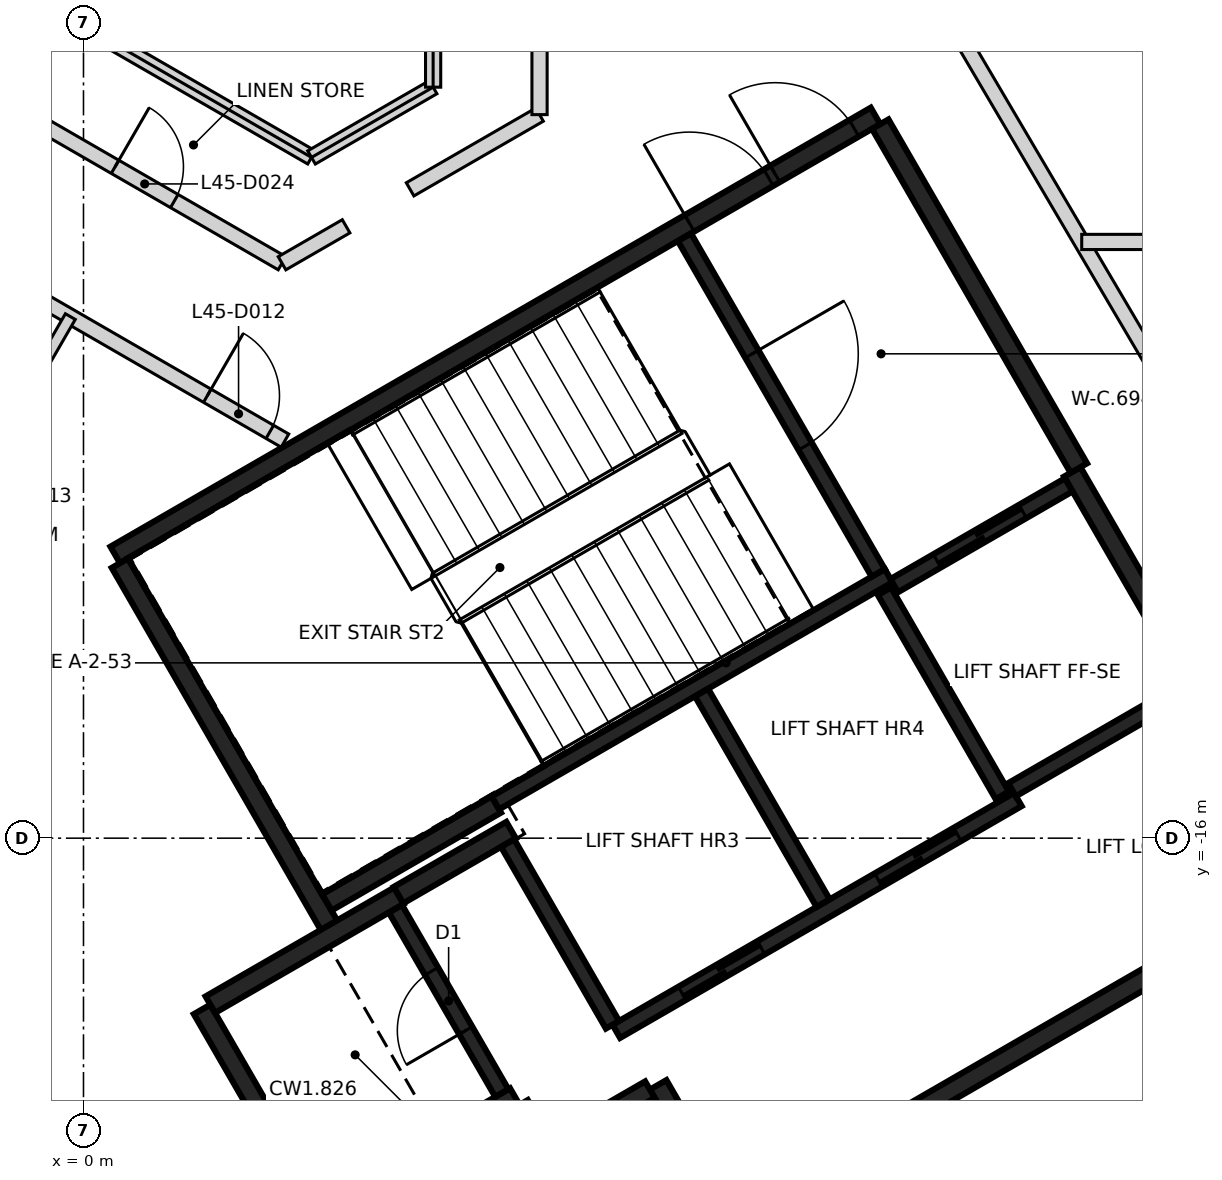
"""IFC4 building model, lengths in metres.
Left out: names, types, materials, properties, quantities, classifications, styles, units other than length and angle.
Written with IfcOpenShell. Run it as: python <this file> out.ifc"""

import sys

from ifc_helpers import new_model, si_unit, direction, frame, frame_2d, origin, place, context, subcontext, project, spatial, rectangle, extrude, element, fill, save


model = new_model("IFC4")
c1 = context("Model", 3, precision=1e-05, world=origin(), true_north=direction((0.0, 1.0)))
c2 = subcontext(c1, "Body", "Model", "MODEL_VIEW")
j1 = project(units=[si_unit("LENGTHUNIT", "METRE"), si_unit("PLANEANGLEUNIT", "RADIAN")], contexts=[c1])
p1 = place(None, origin())
s1 = spatial("IfcSite", under=j1, at=p1, CompositionType="ELEMENT")
p2 = place(p1, origin())
s2 = spatial("IfcBuilding", under=s1, at=p2, CompositionType="ELEMENT")
p3 = place(p2, frame((0.0, 0.0, 182.8)))
s3 = spatial("IfcBuildingStorey", under=s2, at=p3, CompositionType="ELEMENT", Elevation=182.8)
p4 = place(p3, frame((0.417, -12.273, 0.0), z_axis=(0.0, 0.0, 1.0), x_axis=(0.866021906294, 0.500006057782, 0.0)))
e1 = element("IfcWall", 1, at=p4, inside=s3, PredefinedType="SHEAR", context=c2, shape_type="SweptSolid", body=[
    extrude(rectangle(XDim=11.55, YDim=0.25, at=frame_2d((5.775, 0.0))), origin(), (0.0, 0.0, 1.0), 3.25),
])
p5 = place(p4, frame((10.025, 0.0, 0.0)))
e2 = element("IfcOpeningElement", 2, at=p5, cuts=e1, PredefinedType="OPENING", context=c2, shape_type="SweptSolid", body=[
    extrude(rectangle(XDim=1.2, YDim=2.1, at=frame_2d((0.6, 1.05))), frame((0.0, 0.135, 0.0), z_axis=(0.0, -1.0, 0.0), x_axis=(1.0, 0.0, 0.0)), (0.0, 0.0, 1.0), 0.27),
])
p6 = place(p4, frame((8.725, 0.0, 0.0)))
e3 = element("IfcOpeningElement", 3, at=p6, cuts=e1, PredefinedType="OPENING", context=c2, shape_type="SweptSolid", body=[
    extrude(rectangle(XDim=1.2, YDim=2.1, at=frame_2d((0.6, 1.05))), frame((0.0, 0.135, 0.0), z_axis=(0.0, -1.0, 0.0), x_axis=(1.0, 0.0, 0.0)), (0.0, 0.0, 1.0), 0.27),
])
p7 = place(p3, frame((16.133, -16.594, 0.0), z_axis=(0.0, 0.0, 1.0), x_axis=(-0.866022959057, -0.500004234368, 0.0)))
e4 = element("IfcWall", 4, at=p7, inside=s3, PredefinedType="SHEAR", context=c2, shape_type="SweptSolid", body=[
    extrude(rectangle(XDim=8.75, YDim=0.25, at=frame_2d((4.375, 0.0))), origin(), (0.0, 0.0, 1.0), 3.25),
])
p8 = place(p3, frame((13.008, -11.181, 0.0), z_axis=(0.0, 0.0, 1.0), x_axis=(0.500001955336, -0.866024274868, 0.0)))
e5 = element("IfcWall", 5, at=p8, inside=s3, PredefinedType="SHEAR", context=c2, shape_type="SweptSolid", body=[
    extrude(rectangle(XDim=6.125, YDim=0.25, at=frame_2d((3.062, 0.0))), origin(), (0.0, 0.0, 1.0), 3.25),
])
p9 = place(p8, frame((3.563, 0.0, 0.0)))
e6 = element("IfcOpeningElement", 6, at=p9, cuts=e5, PredefinedType="OPENING", context=c2, shape_type="SweptSolid", body=[
    extrude(rectangle(XDim=1.0, YDim=2.1, at=frame_2d((0.5, 1.05))), frame((0.0, 0.135, 0.0), z_axis=(0.0, -1.0, 0.0), x_axis=(1.0, 0.0, 0.0)), (0.0, 0.0, 1.0), 0.27),
])
p10 = place(p3, frame((3.235, -17.153, 0.0), z_axis=(0.0, 0.0, 1.0), x_axis=(-0.500008851346, 0.866020293397, 0.0)))
e7 = element("IfcWall", 7, at=p10, inside=s3, PredefinedType="SHEAR", context=c2, shape_type="SweptSolid", body=[
    extrude(rectangle(XDim=5.51, YDim=0.25, at=frame_2d((2.755, 0.0))), origin(), (0.0, 0.0, 1.0), 3.25),
])
p11 = place(p3, frame((10.483, -6.606, 0.0), z_axis=(0.0, 0.0, 1.0), x_axis=(0.49999885962, -0.866026062182, 0.0)))
e8 = element("IfcWall", 8, at=p11, inside=s3, PredefinedType="SHEAR", context=c2, shape_type="SweptSolid", body=[
    extrude(rectangle(XDim=5.225, YDim=0.25, at=frame_2d((2.612, 0.0))), origin(), (0.0, 0.0, 1.0), 3.25),
])
p12 = place(p3, frame((3.085, -20.894, 0.0), z_axis=(0.0, 0.0, 1.0), x_axis=(-0.499978833458, 0.866037623948, 0.0)))
e9 = element("IfcWall", 9, at=p12, inside=s3, PredefinedType="SHEAR", context=c2, shape_type="SweptSolid", body=[
    extrude(rectangle(XDim=3.05, YDim=0.25, at=frame_2d((1.525, 0.0))), origin(), (0.0, 0.0, 1.0), 3.25),
])
p13 = place(p3, frame((1.669, -18.19, 0.0), z_axis=(0.0, 0.0, 1.0), x_axis=(0.866042235819, 0.499970844928, 0.0)))
e10 = element("IfcWall", 10, at=p13, inside=s3, PredefinedType="SHEAR", context=c2, shape_type="SweptSolid", body=[
    extrude(rectangle(XDim=2.865, YDim=0.25, at=frame_2d((1.432, 0.0))), origin(), (0.0, 0.0, 1.0), 3.25),
])
p14 = place(p3, frame((5.675, -19.399, 0.0), z_axis=(0.0, 0.0, 1.0), x_axis=(-0.866026637627, -0.499997862916, 0.0)))
e11 = element("IfcWall", 11, at=p14, inside=s3, PredefinedType="SHEAR", context=c2, shape_type="SweptSolid", body=[
    extrude(rectangle(XDim=2.865, YDim=0.25, at=frame_2d((1.432, 0.0))), origin(), (0.0, 0.0, 1.0), 3.25),
])
p15 = place(p3, frame((5.431, -15.556, 0.0), z_axis=(0.0, 0.0, 1.0), x_axis=(-0.866022940537, -0.500004266446, 0.0)))
e12 = element("IfcWall", 12, at=p15, inside=s3, PredefinedType="SHEAR", context=c2, shape_type="SweptSolid", body=[
    extrude(rectangle(XDim=2.575, YDim=0.25, at=frame_2d((1.287, 0.0))), origin(), (0.0, 0.0, 1.0), 3.25),
])
p16 = place(p3, frame((8.493, -20.86, 0.0), z_axis=(0.0, 0.0, 1.0), x_axis=(-0.500039802285, 0.866002422705, 0.0)))
e13 = element("IfcWall", 13, at=p16, inside=s3, PredefinedType="SHEAR", context=c2, shape_type="SweptSolid", body=[
    extrude(rectangle(XDim=1.865, YDim=0.25, at=frame_2d((0.932, 0.0))), origin(), (0.0, 0.0, 1.0), 3.25),
])
p17 = place(p3, frame((4.145, -16.749, 0.0), z_axis=(0.0, 0.0, 1.0), x_axis=(0.866038183914, 0.499977863513, 0.0)))
e14 = element("IfcWall", 14, at=p17, inside=s3, PredefinedType="SHEAR", context=c2, shape_type="SweptSolid", body=[
    extrude(rectangle(XDim=1.71, YDim=0.25, at=frame_2d((0.855, 0.0))), origin(), (0.0, 0.0, 1.0), 3.25),
])
p18 = place(p3, frame((7.452, -19.308, 0.0), z_axis=(0.0, 0.0, 1.0), x_axis=(-0.866044474677, -0.49996696679, 0.0)))
e15 = element("IfcWall", 15, at=p18, inside=s3, PredefinedType="SHEAR", context=c2, shape_type="SweptSolid", body=[
    extrude(rectangle(XDim=1.584, YDim=0.25, at=frame_2d((0.792, 0.0))), origin(), (0.0, 0.0, 1.0), 3.25),
])
p19 = place(p3, frame((6.017, -19.992, 0.0), z_axis=(0.0, 0.0, 1.0), x_axis=(-0.500364886717, 0.865814633822, 0.0)))
e16 = element("IfcWall", 16, at=p19, inside=s3, PredefinedType="SHEAR", context=c2, shape_type="SweptSolid", body=[
    extrude(rectangle(XDim=0.559, YDim=0.25, at=frame_2d((0.28, 0.0))), origin(), (0.0, 0.0, 1.0), 3.25),
])
p20 = place(p3, frame((5.419, -15.534, 0.0), z_axis=(0.0, 0.0, 1.0), x_axis=(0.866029065029, 0.499993658486, 0.0)))
e17 = element("IfcWall", 17, at=p20, inside=s3, PredefinedType="SHEAR", context=c2, shape_type="SweptSolid", body=[
    extrude(rectangle(XDim=5.974, YDim=0.2, at=frame_2d((2.987, 0.0))), origin(), (0.0, 0.0, 1.0), 3.25),
])
p21 = place(p3, frame((7.01, -18.542, 0.0), z_axis=(0.0, 0.0, 1.0), x_axis=(0.866030299012, 0.499991521122, 0.0)))
e18 = element("IfcWall", 18, at=p21, inside=s3, PredefinedType="SHEAR", context=c2, shape_type="SweptSolid", body=[
    extrude(rectangle(XDim=6.1, YDim=0.2, at=frame_2d((3.05, 0.0))), origin(), (0.0, 0.0, 1.0), 3.25),
])
p22 = place(p21, frame((1.0, 0.0, 0.0)))
e19 = element("IfcOpeningElement", 19, at=p22, cuts=e18, PredefinedType="OPENING", context=c2, shape_type="SweptSolid", body=[
    extrude(rectangle(XDim=1.2, YDim=2.1, at=frame_2d((0.6, 1.05))), frame((0.0, 0.11, 0.0), z_axis=(0.0, -1.0, 0.0), x_axis=(1.0, 0.0, 0.0)), (0.0, 0.0, 1.0), 0.22),
])
p23 = place(p21, frame((3.982, 0.0, 0.0)))
e20 = element("IfcOpeningElement", 20, at=p23, cuts=e18, PredefinedType="OPENING", context=c2, shape_type="SweptSolid", body=[
    extrude(rectangle(XDim=1.2, YDim=2.1, at=frame_2d((0.6, 1.05))), frame((0.0, 0.11, 0.0), z_axis=(0.0, -1.0, 0.0), x_axis=(1.0, 0.0, 0.0)), (0.0, 0.0, 1.0), 0.22),
])
p24 = place(p3, frame((7.906, -8.094, 0.0), z_axis=(0.0, 0.0, 1.0), x_axis=(0.500027839223, -0.866009330205, 0.0)))
e21 = element("IfcWall", 21, at=p24, inside=s3, PredefinedType="SHEAR", context=c2, shape_type="SweptSolid", body=[
    extrude(rectangle(XDim=5.098, YDim=0.2, at=frame_2d((2.549, 0.0))), origin(), (0.0, 0.0, 1.0), 3.25),
])
p25 = place(p24, frame((1.774, 0.0, 0.0)))
e22 = element("IfcOpeningElement", 22, at=p25, cuts=e21, PredefinedType="OPENING", context=c2, shape_type="SweptSolid", body=[
    extrude(rectangle(XDim=1.4, YDim=2.1, at=frame_2d((0.7, 1.05))), frame((0.0, 0.11, 0.0), z_axis=(0.0, -1.0, 0.0), x_axis=(1.0, 0.0, 0.0)), (0.0, 0.0, 1.0), 0.22),
])
p26 = place(p3, frame((8.132, -14.084, 0.0), z_axis=(0.0, 0.0, 1.0), x_axis=(0.499997778408, -0.866026686418, 0.0)))
e23 = element("IfcWall", 23, at=p26, inside=s3, PredefinedType="SHEAR", context=c2, shape_type="SweptSolid", body=[
    extrude(rectangle(XDim=3.198, YDim=0.2, at=frame_2d((1.599, 0.0))), origin(), (0.0, 0.0, 1.0), 3.25),
])
p27 = place(p3, frame((5.503, -19.352, 0.0), z_axis=(0.0, 0.0, 1.0), x_axis=(-0.499986818241, 0.866033014143, 0.0)))
e24 = element("IfcWall", 24, at=p27, inside=s3, PredefinedType="SHEAR", context=c2, shape_type="SweptSolid", body=[
    extrude(rectangle(XDim=2.798, YDim=0.2, at=frame_2d((1.399, 0.0))), origin(), (0.0, 0.0, 1.0), 3.25),
])
p28 = place(p27, frame((0.949, 0.0, 0.0)))
e25 = element("IfcOpeningElement", 25, at=p28, cuts=e24, PredefinedType="OPENING", context=c2, shape_type="SweptSolid", body=[
    extrude(rectangle(XDim=0.9, YDim=2.1, at=frame_2d((0.45, 1.05))), frame((0.0, 0.11, 0.0), z_axis=(0.0, -1.0, 0.0), x_axis=(1.0, 0.0, 0.0)), (0.0, 0.0, 1.0), 0.22),
])
p29 = place(p3, frame((6.96, -18.455, 0.0), z_axis=(0.0, 0.0, 1.0), x_axis=(-0.499926705758, 0.866067716099, 0.0)))
e26 = element("IfcWall", 26, at=p29, inside=s3, PredefinedType="SHEAR", context=c2, shape_type="SweptSolid", body=[
    extrude(rectangle(XDim=2.759, YDim=0.2, at=frame_2d((1.38, 0.0))), origin(), (0.0, 0.0, 1.0), 3.25),
])
p30 = place(p3, frame((12.088, -15.437, 0.0), z_axis=(0.0, 0.0, 1.0), x_axis=(-0.500026960575, 0.86600983753, 0.0)))
e27 = element("IfcWall", 27, at=p30, inside=s3, PredefinedType="SHEAR", context=c2, shape_type="SweptSolid", body=[
    extrude(rectangle(XDim=3.1, YDim=0.2, at=frame_2d((1.55, 0.0))), origin(), (0.0, 0.0, 1.0), 3.25),
])
p31 = place(p3, frame((10.666, -12.678, 0.0), z_axis=(0.0, 0.0, 1.0), x_axis=(0.866018407898, 0.500012117035, 0.0)))
e28 = element("IfcWall", 28, at=p31, inside=s3, PredefinedType="SHEAR", context=c2, shape_type="SweptSolid", body=[
    extrude(rectangle(XDim=2.651, YDim=0.2, at=frame_2d((1.325, 0.0))), origin(), (0.0, 0.0, 1.0), 3.25),
])
p32 = place(p31, frame((0.652, 0.0, 0.0)))
e29 = element("IfcOpeningElement", 29, at=p32, cuts=e28, PredefinedType="OPENING", context=c2, shape_type="SweptSolid", body=[
    extrude(rectangle(XDim=1.3, YDim=2.1, at=frame_2d((0.65, 1.05))), frame((0.0, 0.11, 0.0), z_axis=(0.0, -1.0, 0.0), x_axis=(1.0, 0.0, 0.0)), (0.0, 0.0, 1.0), 0.22),
])
p33 = place(p3, frame((14.512, -14.037, 0.0), z_axis=(0.0, 0.0, 1.0), x_axis=(-0.866018407898, -0.500012117035, 0.0)))
e30 = element("IfcWall", 30, at=p33, inside=s3, PredefinedType="SHEAR", context=c2, shape_type="SweptSolid", body=[
    extrude(rectangle(XDim=2.651, YDim=0.2, at=frame_2d((1.325, 0.0))), origin(), (0.0, 0.0, 1.0), 3.25),
])
p34 = place(p3, frame((-8.612, -1.956, 0.0), z_axis=(0.0, 0.0, 1.0), x_axis=(0.866034386606, -0.499984440973, 0.0)))
e31 = element("IfcWall", 31, at=p34, inside=s3, PredefinedType="PARTITIONING", context=c2, shape_type="SweptSolid", body=[
    extrude(rectangle(XDim=12.96, YDim=0.2, at=frame_2d((6.48, 0.0))), origin(), (0.0, 0.0, 1.0), 3.25),
])
p35 = place(p34, frame((3.955, 0.0, 0.0)))
e32 = element("IfcOpeningElement", 32, at=p35, cuts=e31, PredefinedType="OPENING", context=c2, shape_type="SweptSolid", body=[
    extrude(rectangle(XDim=0.9, YDim=2.1, at=frame_2d((0.45, 1.05))), frame((0.0, 0.11, 0.0), z_axis=(0.0, -1.0, 0.0), x_axis=(1.0, 0.0, 0.0)), (0.0, 0.0, 1.0), 0.22),
])
p36 = place(p34, frame((10.424, 0.0, 0.0)))
e33 = element("IfcOpeningElement", 33, at=p36, cuts=e31, PredefinedType="OPENING", context=c2, shape_type="SweptSolid", body=[
    extrude(rectangle(XDim=0.9, YDim=2.1, at=frame_2d((0.45, 1.05))), frame((0.0, 0.11, 0.0), z_axis=(0.0, -1.0, 0.0), x_axis=(1.0, 0.0, 0.0)), (0.0, 0.0, 1.0), 0.22),
])
p37 = place(p3, frame((-8.301, -4.445, 0.0), z_axis=(0.0, 0.0, 1.0), x_axis=(0.865969859016, -0.500096194023, 0.0)))
e34 = element("IfcWall", 34, at=p37, inside=s3, PredefinedType="PARTITIONING", context=c2, shape_type="SweptSolid", body=[
    extrude(rectangle(XDim=12.647, YDim=0.2, at=frame_2d((6.323, 0.0))), origin(), (0.0, 0.0, 1.0), 3.25),
])
p38 = place(p37, frame((2.836, 0.0, 0.0)))
e35 = element("IfcOpeningElement", 35, at=p38, cuts=e34, PredefinedType="OPENING", context=c2, shape_type="SweptSolid", body=[
    extrude(rectangle(XDim=0.95, YDim=2.1, at=frame_2d((0.475, 1.05))), frame((0.0, 0.11, 0.0), z_axis=(0.0, -1.0, 0.0), x_axis=(1.0, 0.0, 0.0)), (0.0, 0.0, 1.0), 0.22),
])
p39 = place(p37, frame((11.467, 0.0, 0.0)))
e36 = element("IfcOpeningElement", 36, at=p39, cuts=e34, PredefinedType="OPENING", context=c2, shape_type="SweptSolid", body=[
    extrude(rectangle(XDim=0.95, YDim=2.1, at=frame_2d((0.475, 1.05))), frame((0.0, 0.11, 0.0), z_axis=(0.0, -1.0, 0.0), x_axis=(1.0, 0.0, 0.0)), (0.0, 0.0, 1.0), 0.22),
])
p40 = place(p3, frame((2.612, -8.437, 0.0), z_axis=(0.0, 0.0, 1.0), x_axis=(0.866026830048, 0.499997529631, 0.0)))
e37 = element("IfcWall", 37, at=p40, inside=s3, PredefinedType="PARTITIONING", context=c2, shape_type="SweptSolid", body=[
    extrude(rectangle(XDim=0.973, YDim=0.2, at=frame_2d((0.487, 0.0))), origin(), (0.0, 0.0, 1.0), 3.25),
])
p41 = place(p3, frame((4.297, -7.464, 0.0), z_axis=(0.0, 0.0, 1.0), x_axis=(0.866026378386, 0.499998311937, 0.0)))
e38 = element("IfcWall", 38, at=p41, inside=s3, PredefinedType="PARTITIONING", context=c2, shape_type="SweptSolid", body=[
    extrude(rectangle(XDim=1.966, YDim=0.2, at=frame_2d((0.983, 0.0))), origin(), (0.0, 0.0, 1.0), 3.25),
])
p42 = place(p3, frame((6.0, -6.481, 0.0), z_axis=(0.0, 0.0, 1.0), x_axis=(0.0, 1.0, 0.0)))
e39 = element("IfcWall", 39, at=p42, inside=s3, PredefinedType="PARTITIONING", context=c2, shape_type="SweptSolid", body=[
    extrude(rectangle(XDim=12.962, YDim=0.2, at=frame_2d((6.481, 0.0))), origin(), (0.0, 0.0, 1.0), 3.25),
])
p43 = place(p42, frame((3.956, 0.0, 0.0)))
e40 = element("IfcOpeningElement", 40, at=p43, cuts=e39, PredefinedType="OPENING", context=c2, shape_type="SweptSolid", body=[
    extrude(rectangle(XDim=0.9, YDim=2.1, at=frame_2d((0.45, 1.05))), frame((0.0, 0.11, 0.0), z_axis=(0.0, -1.0, 0.0), x_axis=(1.0, 0.0, 0.0)), (0.0, 0.0, 1.0), 0.22),
])
p44 = place(p42, frame((10.425, 0.0, 0.0)))
e41 = element("IfcOpeningElement", 41, at=p44, cuts=e39, PredefinedType="OPENING", context=c2, shape_type="SweptSolid", body=[
    extrude(rectangle(XDim=0.9, YDim=2.1, at=frame_2d((0.45, 1.05))), frame((0.0, 0.11, 0.0), z_axis=(0.0, -1.0, 0.0), x_axis=(1.0, 0.0, 0.0)), (0.0, 0.0, 1.0), 0.22),
])
p45 = place(p3, frame((11.571, -5.505, 0.0), z_axis=(0.0, 0.0, 1.0), x_axis=(0.507311705706, -0.861762631618, 0.0)))
e42 = element("IfcWall", 42, at=p45, inside=s3, PredefinedType="PARTITIONING", context=c2, shape_type="SweptSolid", body=[
    extrude(rectangle(XDim=10.391, YDim=0.2, at=frame_2d((5.196, 0.0))), origin(), (0.0, 0.0, 1.0), 3.25),
])
p46 = place(p45, frame((6.228, 0.0, 0.0)))
e43 = element("IfcOpeningElement", 43, at=p46, cuts=e42, PredefinedType="OPENING", context=c2, shape_type="SweptSolid", body=[
    extrude(rectangle(XDim=1.0, YDim=2.1, at=frame_2d((0.5, 1.05))), frame((0.0, 0.11, 0.0), z_axis=(0.0, -1.0, 0.0), x_axis=(1.0, 0.0, 0.0)), (0.0, 0.0, 1.0), 0.22),
])
p47 = place(p3, frame((-7.6, -0.924, 0.0), z_axis=(0.0, 0.0, 1.0), x_axis=(0.866028806638, -0.499994106039, 0.0)))
e44 = element("IfcWall", 44, at=p47, inside=s3, PredefinedType="PARTITIONING", context=c2, shape_type="SweptSolid", body=[
    extrude(rectangle(XDim=12.24, YDim=0.2, at=frame_2d((6.12, 0.0))), origin(), (0.0, 0.0, 1.0), 3.25),
])
p48 = place(p3, frame((-0.992, -6.355, 0.0), z_axis=(0.0, 0.0, 1.0), x_axis=(0.500059638837, 0.865990968548, 0.0)))
e45 = element("IfcWall", 45, at=p48, inside=s3, PredefinedType="PARTITIONING", context=c2, shape_type="SweptSolid", body=[
    extrude(rectangle(XDim=1.4, YDim=0.2, at=frame_2d((0.7, 0.0))), origin(), (0.0, 0.0, 1.0), 3.25),
])
p49 = place(p3, frame((3.0, -7.044, 0.0), z_axis=(0.0, 0.0, 1.0), x_axis=(0.865875248522, 0.500259986404, 0.0)))
e46 = element("IfcWall", 46, at=p49, inside=s3, PredefinedType="PARTITIONING", context=c2, shape_type="SweptSolid", body=[
    extrude(rectangle(XDim=1.848, YDim=0.2, at=frame_2d((0.924, 0.0))), origin(), (0.0, 0.0, 1.0), 3.25),
])
p50 = place(p3, frame((4.6, -6.12, 0.0), z_axis=(0.0, 0.0, 1.0), x_axis=(0.0, 1.0, 0.0)))
e47 = element("IfcWall", 47, at=p50, inside=s3, PredefinedType="PARTITIONING", context=c2, shape_type="SweptSolid", body=[
    extrude(rectangle(XDim=12.24, YDim=0.2, at=frame_2d((6.12, 0.0))), origin(), (0.0, 0.0, 1.0), 3.25),
])
p51 = place(p3, frame((13.133, -8.156, 0.0), z_axis=(0.0, 0.0, 1.0), x_axis=(1.0, 0.0, 0.0)))
e48 = element("IfcWall", 48, at=p51, inside=s3, PredefinedType="PARTITIONING", context=c2, shape_type="SweptSolid", body=[
    extrude(rectangle(XDim=6.076, YDim=0.2, at=frame_2d((3.038, 0.0))), origin(), (0.0, 0.0, 1.0), 2.35),
])
p52 = place(p3, frame((-1.373, -11.216, 0.0), z_axis=(0.0, 0.0, 1.0), x_axis=(0.500045362686, 0.865999212041, 0.0)))
e49 = element("IfcWall", 49, at=p52, inside=s3, PredefinedType="PARTITIONING", context=c2, shape_type="SweptSolid", body=[
    extrude(rectangle(XDim=2.4, YDim=0.15, at=frame_2d((1.2, 0.0))), origin(), (0.0, 0.0, 1.0), 3.25),
])
p53 = place(p52, frame((0.8, 0.0, 0.0)))
e50 = element("IfcOpeningElement", 50, at=p53, cuts=e49, PredefinedType="OPENING", context=c2, shape_type="SweptSolid", body=[
    extrude(rectangle(XDim=0.8, YDim=2.1, at=frame_2d((0.4, 1.05))), frame((0.0, 0.085, 0.0), z_axis=(0.0, -1.0, 0.0), x_axis=(1.0, 0.0, 0.0)), (0.0, 0.0, 1.0), 0.17),
])
p54 = place(p32, origin())
e51 = element("IfcDoor", 51, at=p54, inside=s3, OperationType="SLIDING_TO_LEFT", PredefinedType="DOOR", context=c2, shape_type="SweptSolid", body=[
    extrude(rectangle(XDim=1.3, YDim=2.1, at=frame_2d((0.65, 1.05))), frame((0.0, 0.025, 0.0), z_axis=(0.0, -1.0, 0.0), x_axis=(1.0, 0.0, 0.0)), (0.0, 0.0, 1.0), 0.05),
])
fill(e29, e51)
p55 = place(p22, origin())
e52 = element("IfcDoor", 52, at=p55, inside=s3, OperationType="DOUBLE_DOOR_SLIDING", PredefinedType="DOOR", context=c2, shape_type="SweptSolid", body=[
    extrude(rectangle(XDim=1.2, YDim=2.1, at=frame_2d((0.6, 1.05))), frame((0.0, 0.025, 0.0), z_axis=(0.0, -1.0, 0.0), x_axis=(1.0, 0.0, 0.0)), (0.0, 0.0, 1.0), 0.05),
])
fill(e19, e52)
p56 = place(p23, origin())
e53 = element("IfcDoor", 53, at=p56, inside=s3, OperationType="DOUBLE_DOOR_SLIDING", PredefinedType="DOOR", context=c2, shape_type="SweptSolid", body=[
    extrude(rectangle(XDim=1.2, YDim=2.1, at=frame_2d((0.6, 1.05))), frame((0.0, 0.025, 0.0), z_axis=(0.0, -1.0, 0.0), x_axis=(1.0, 0.0, 0.0)), (0.0, 0.0, 1.0), 0.05),
])
fill(e20, e53)
p57 = place(p5, origin())
e54 = element("IfcDoor", 54, at=p57, inside=s3, OperationType="SINGLE_SWING_LEFT", PredefinedType="DOOR", context=c2, shape_type="SweptSolid", body=[
    extrude(rectangle(XDim=1.2, YDim=2.1, at=frame_2d((0.6, 1.05))), frame((0.0, 0.025, 0.0), z_axis=(0.0, -1.0, 0.0), x_axis=(1.0, 0.0, 0.0)), (0.0, 0.0, 1.0), 0.05),
])
fill(e2, e54)
p58 = place(p6, origin())
e55 = element("IfcDoor", 55, at=p58, inside=s3, OperationType="SINGLE_SWING_RIGHT", PredefinedType="DOOR", context=c2, shape_type="SweptSolid", body=[
    extrude(rectangle(XDim=1.2, YDim=2.1, at=frame_2d((0.6, 1.05))), frame((0.0, 0.025, 0.0), z_axis=(0.0, -1.0, 0.0), x_axis=(1.0, 0.0, 0.0)), (0.0, 0.0, 1.0), 0.05),
])
fill(e3, e55)
p59 = place(p25, origin())
e56 = element("IfcDoor", 56, at=p59, inside=s3, OperationType="SINGLE_SWING_LEFT", PredefinedType="DOOR", context=c2, shape_type="SweptSolid", body=[
    extrude(rectangle(XDim=1.4, YDim=2.1, at=frame_2d((0.7, 1.05))), frame((0.0, 0.025, 0.0), z_axis=(0.0, -1.0, 0.0), x_axis=(1.0, 0.0, 0.0)), (0.0, 0.0, 1.0), 0.05),
])
fill(e22, e56)
p60 = place(p28, origin())
e57 = element("IfcDoor", 57, at=p60, inside=s3, OperationType="SINGLE_SWING_RIGHT", PredefinedType="DOOR", context=c2, shape_type="SweptSolid", body=[
    extrude(rectangle(XDim=0.9, YDim=2.1, at=frame_2d((0.45, 1.05))), frame((0.0, 0.025, 0.0), z_axis=(0.0, -1.0, 0.0), x_axis=(1.0, 0.0, 0.0)), (0.0, 0.0, 1.0), 0.05),
])
fill(e25, e57)
p61 = place(p39, frame((0.95, 0.0, 0.0), z_axis=(0.0, 0.0, 1.0), x_axis=(-1.0, 0.0, 0.0)))
e58 = element("IfcDoor", 58, at=p61, inside=s3, OperationType="SINGLE_SWING_LEFT", PredefinedType="DOOR", context=c2, shape_type="SweptSolid", body=[
    extrude(rectangle(XDim=0.95, YDim=2.1, at=frame_2d((0.475, 1.05))), frame((0.0, 0.025, 0.0), z_axis=(0.0, -1.0, 0.0), x_axis=(1.0, 0.0, 0.0)), (0.0, 0.0, 1.0), 0.05),
])
fill(e36, e58)
p62 = place(p36, origin())
e59 = element("IfcDoor", 59, at=p62, inside=s3, OperationType="SINGLE_SWING_LEFT", PredefinedType="DOOR", context=c2, shape_type="SweptSolid", body=[
    extrude(rectangle(XDim=0.9, YDim=2.1, at=frame_2d((0.45, 1.05))), frame((0.0, 0.025, 0.0), z_axis=(0.0, -1.0, 0.0), x_axis=(1.0, 0.0, 0.0)), (0.0, 0.0, 1.0), 0.05),
])
fill(e33, e59)
save(model, sys.argv[1])
